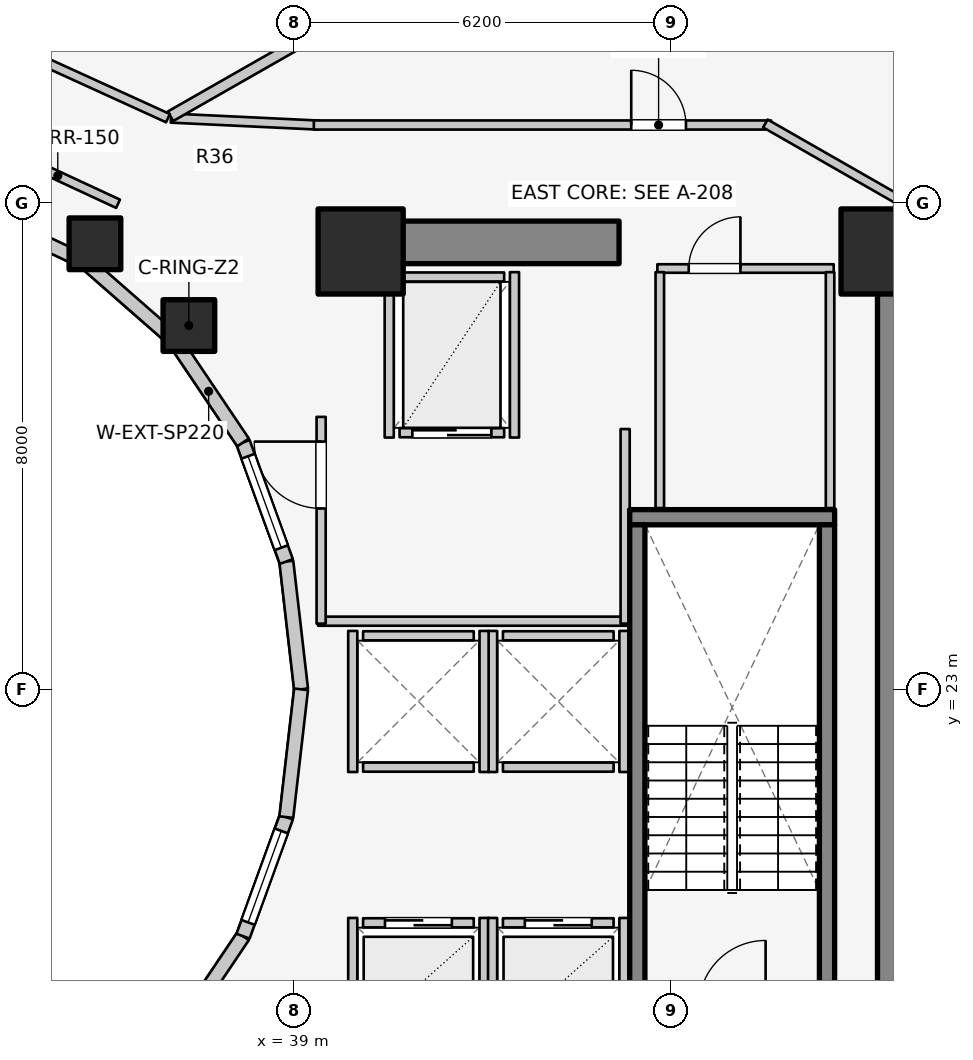
"""IFC4 building model, lengths in metres.
Left out: names, types, materials, properties, quantities, classifications, styles, units other than length and angle.
Written with IfcOpenShell. Run it as: python <this file> out.ifc"""

import sys

from ifc_helpers import new_model, si_unit, direction, frame, frame_2d, origin, origin_2d, place, context, subcontext, project, spatial, rectangle, extrude, element, fill, save


model = new_model("IFC4")
c1 = context("Model", 3, precision=1e-05, world=origin(), true_north=direction((0.0, 1.0)))
c2 = subcontext(c1, "Body", "Model", "MODEL_VIEW")
j1 = project(units=[si_unit("LENGTHUNIT", "METRE"), si_unit("PLANEANGLEUNIT", "RADIAN")], contexts=[c1])
p1 = place(None, origin())
s1 = spatial("IfcSite", under=j1, at=p1, CompositionType="ELEMENT")
p2 = place(p1, origin())
s2 = spatial("IfcBuilding", under=s1, at=p2, CompositionType="ELEMENT")
p3 = place(p2, frame((0.0, 0.0, 85.6)))
s3 = spatial("IfcBuildingStorey", under=s2, at=p3, CompositionType="ELEMENT", Elevation=85.6)
p4 = place(p3, frame((48.95, 17.05, 0.0), z_axis=(0.0, 0.0, 1.0), x_axis=(0.0, 1.0, 0.0)))
e1 = element("IfcWall", 1, at=p4, inside=s3, PredefinedType="SHEAR", context=c2, shape_type="SweptSolid", body=[
    extrude(rectangle(XDim=12.8, YDim=0.7, at=frame_2d((6.4, 0.0))), origin(), (0.0, 0.0, 1.0), 3.1),
])
p5 = place(p3, frame((39.85, 30.35, 0.0), z_axis=(0.0, 0.0, 1.0), x_axis=(1.0, 0.0, 0.0)))
e2 = element("IfcWall", 2, at=p5, inside=s3, PredefinedType="SHEAR", context=c2, shape_type="SweptSolid", body=[
    extrude(rectangle(XDim=4.5, YDim=0.7, at=frame_2d((2.25, 0.0))), origin(), (0.0, 0.0, 1.0), 3.1),
])
p6 = place(p3, frame((44.525, 25.83, 0.0), z_axis=(0.0, 0.0, 1.0), x_axis=(1.0, 0.0, 0.0)))
e3 = element("IfcWall", 3, at=p6, inside=s3, PredefinedType="SOLIDWALL", context=c2, shape_type="SweptSolid", body=[
    extrude(rectangle(XDim=3.37, YDim=0.25, at=frame_2d((1.685, 0.0))), origin(), (0.0, 0.0, 1.0), 3.1),
])
for number, where, z_axis, x_axis in (
    (4, (44.65, 17.895, 0.0), (0.0, 0.0, 1.0), (0.0, 1.0, 0.0)),
    (5, (47.77, 17.895, 0.0), (0.0, 0.0, 1.0), (0.0, 1.0, 0.0)),
):
    element("IfcWall", number, at=place(p3, frame(where, z_axis=z_axis, x_axis=x_axis)), inside=s3, PredefinedType="SOLIDWALL", context=c2, shape_type="SweptSolid", body=[
        extrude(rectangle(XDim=7.81, YDim=0.25, at=frame_2d((3.905, 0.0))), origin(), (0.0, 0.0, 1.0), 3.1),
    ])
for number, where, z_axis, x_axis in (
    (6, (48.7, 30.2, 0.0), (0.0, 0.0, 1.0), (1.0, 0.0, 0.0)),
    (7, (40.1, 30.2, 0.0), (0.0, 0.0, 1.0), (1.0, 0.0, 0.0)),
):
    element("IfcColumn", number, at=place(p3, frame(where, z_axis=z_axis, x_axis=x_axis)), inside=s3, PredefinedType="COLUMN", context=c2, shape_type="SweptSolid", body=[
        extrude(rectangle(XDim=1.4, YDim=1.4, at=origin_2d()), origin(), (0.0, 0.0, 1.0), 3.1),
    ])
for number, where, z_axis, x_axis in (
    (8, (37.275, 28.982, 0.0), (0.0, 0.0, 1.0), (1.0, 0.0, 0.0)),
    (9, (35.73, 30.327, 0.0), (0.0, 0.0, 1.0), (1.0, 0.0, 0.0)),
):
    element("IfcColumn", number, at=place(p3, frame(where, z_axis=z_axis, x_axis=x_axis)), inside=s3, PredefinedType="COLUMN", context=c2, shape_type="SweptSolid", body=[
        extrude(rectangle(XDim=0.85, YDim=0.85, at=origin_2d()), origin(), (0.0, 0.0, 1.0), 3.1),
    ])
p7 = place(p3, frame((39.12, 23.0, 0.0), z_axis=(0.0, 0.0, 1.0), x_axis=(-0.114711713601, 0.993398823617, 0.0)))
e10 = element("IfcWall", 10, at=p7, inside=s3, PredefinedType="STANDARD", context=c2, shape_type="SweptSolid", body=[
    extrude(rectangle(XDim=2.115, YDim=0.23, at=frame_2d((1.058, 0.0))), origin(), (0.0, 0.0, 1.0), 2.84),
])
p8 = place(p3, frame((38.877, 25.102, 0.0), z_axis=(0.0, 0.0, 1.0), x_axis=(-0.341423187295, 0.93990968033, 0.0)))
e11 = element("IfcWall", 11, at=p8, inside=s3, PredefinedType="STANDARD", context=c2, shape_type="SweptSolid", body=[
    extrude(rectangle(XDim=2.084, YDim=0.23, at=frame_2d((1.042, 0.0))), origin(), (0.0, 0.0, 1.0), 2.84),
])
p9 = place(p8, frame((0.242, 0.0, 0.85)))
e12 = element("IfcOpeningElement", 12, at=p9, cuts=e11, PredefinedType="OPENING", context=c2, shape_type="SweptSolid", body=[
    extrude(rectangle(XDim=1.6, YDim=1.65, at=frame_2d((0.8, 0.825))), frame((0.0, 0.125, 0.0), z_axis=(0.0, -1.0, 0.0), x_axis=(1.0, 0.0, 0.0)), (0.0, 0.0, 1.0), 0.25),
])
p10 = place(p3, frame((38.166, 27.06, 0.0), z_axis=(0.0, 0.0, 1.0), x_axis=(-0.558197800898, 0.829707909492, 0.0)))
e13 = element("IfcWall", 13, at=p10, inside=s3, PredefinedType="STANDARD", context=c2, shape_type="SweptSolid", body=[
    extrude(rectangle(XDim=2.027, YDim=0.23, at=frame_2d((1.013, 0.0))), origin(), (0.0, 0.0, 1.0), 2.16),
])
p11 = place(p3, frame((37.035, 28.742, 0.0), z_axis=(0.0, 0.0, 1.0), x_axis=(-0.752576694707, 0.658504607869, 0.0)))
e14 = element("IfcWall", 14, at=p11, inside=s3, PredefinedType="STANDARD", context=c2, shape_type="SweptSolid", body=[
    extrude(rectangle(XDim=1.959, YDim=0.23, at=frame_2d((0.98, 0.0))), origin(), (0.0, 0.0, 1.0), 2.16),
])
p12 = place(p3, frame((35.56, 30.032, 0.0), z_axis=(0.0, 0.0, 1.0), x_axis=(-0.904179699603, 0.427152280606, 0.0)))
e15 = element("IfcWall", 15, at=p12, inside=s3, PredefinedType="STANDARD", context=c2, shape_type="SweptSolid", body=[
    extrude(rectangle(XDim=1.899, YDim=0.23, at=frame_2d((0.95, 0.0))), origin(), (0.0, 0.0, 1.0), 2.16),
])
p13 = place(p3, frame((37.035, 17.258, 0.0), z_axis=(0.0, 0.0, 1.0), x_axis=(0.558197800898, 0.829707909492, 0.0)))
e16 = element("IfcWall", 16, at=p13, inside=s3, PredefinedType="STANDARD", context=c2, shape_type="SweptSolid", body=[
    extrude(rectangle(XDim=2.027, YDim=0.23, at=frame_2d((1.013, 0.0))), origin(), (0.0, 0.0, 1.0), 2.16),
])
p14 = place(p3, frame((38.166, 18.94, 0.0), z_axis=(0.0, 0.0, 1.0), x_axis=(0.341423187295, 0.93990968033, 0.0)))
e17 = element("IfcWall", 17, at=p14, inside=s3, PredefinedType="STANDARD", context=c2, shape_type="SweptSolid", body=[
    extrude(rectangle(XDim=2.084, YDim=0.23, at=frame_2d((1.042, 0.0))), origin(), (0.0, 0.0, 1.0), 2.84),
])
p15 = place(p14, frame((0.242, 0.0, 0.85)))
e18 = element("IfcOpeningElement", 18, at=p15, cuts=e17, PredefinedType="OPENING", context=c2, shape_type="SweptSolid", body=[
    extrude(rectangle(XDim=1.6, YDim=1.65, at=frame_2d((0.8, 0.825))), frame((0.0, 0.125, 0.0), z_axis=(0.0, -1.0, 0.0), x_axis=(1.0, 0.0, 0.0)), (0.0, 0.0, 1.0), 0.25),
])
p16 = place(p3, frame((38.877, 20.898, 0.0), z_axis=(0.0, 0.0, 1.0), x_axis=(0.114711713601, 0.993398823617, 0.0)))
e19 = element("IfcWall", 19, at=p16, inside=s3, PredefinedType="STANDARD", context=c2, shape_type="SweptSolid", body=[
    extrude(rectangle(XDim=2.115, YDim=0.23, at=frame_2d((1.058, 0.0))), origin(), (0.0, 0.0, 1.0), 2.84),
])
p17 = place(p3, frame((40.14, 19.16, 0.0), z_axis=(0.0, 0.0, 1.0), x_axis=(1.0, 0.0, 0.0)))
e20 = element("IfcWall", 20, at=p17, inside=s3, PredefinedType="SOLIDWALL", context=c2, shape_type="SweptSolid", body=[
    extrude(rectangle(XDim=1.82, YDim=0.15, at=frame_2d((0.91, 0.0))), origin(), (0.0, 0.0, 1.0), 2.12),
])
p18 = place(p17, frame((0.36, 0.0, 0.0)))
e21 = element("IfcOpeningElement", 21, at=p18, cuts=e20, PredefinedType="OPENING", context=c2, shape_type="SweptSolid", body=[
    extrude(rectangle(XDim=1.1, YDim=2.1, at=frame_2d((0.55, 1.05))), frame((0.0, 0.085, 0.0), z_axis=(0.0, -1.0, 0.0), x_axis=(1.0, 0.0, 0.0)), (0.0, 0.0, 1.0), 0.17),
])
p19 = place(p3, frame((39.97, 17.02, 0.0), z_axis=(0.0, 0.0, 1.0), x_axis=(0.0, 1.0, 0.0)))
e22 = element("IfcWall", 22, at=p19, inside=s3, PredefinedType="SOLIDWALL", context=c2, shape_type="SweptSolid", body=[
    extrude(rectangle(XDim=2.22, YDim=0.15, at=frame_2d((1.11, 0.0))), origin(), (0.0, 0.0, 1.0), 2.12),
])
p20 = place(p3, frame((42.13, 17.02, 0.0), z_axis=(0.0, 0.0, 1.0), x_axis=(0.0, 1.0, 0.0)))
e23 = element("IfcWall", 23, at=p20, inside=s3, PredefinedType="SOLIDWALL", context=c2, shape_type="SweptSolid", body=[
    extrude(rectangle(XDim=2.22, YDim=0.15, at=frame_2d((1.11, 0.0))), origin(), (0.0, 0.0, 1.0), 2.855),
])
p21 = place(p3, frame((42.44, 19.16, 0.0), z_axis=(0.0, 0.0, 1.0), x_axis=(1.0, 0.0, 0.0)))
e24 = element("IfcWall", 24, at=p21, inside=s3, PredefinedType="SOLIDWALL", context=c2, shape_type="SweptSolid", body=[
    extrude(rectangle(XDim=1.82, YDim=0.15, at=frame_2d((0.91, 0.0))), origin(), (0.0, 0.0, 1.0), 2.855),
])
p22 = place(p21, frame((0.36, 0.0, 0.0)))
e25 = element("IfcOpeningElement", 25, at=p22, cuts=e24, PredefinedType="OPENING", context=c2, shape_type="SweptSolid", body=[
    extrude(rectangle(XDim=1.1, YDim=2.1, at=frame_2d((0.55, 1.05))), frame((0.0, 0.085, 0.0), z_axis=(0.0, -1.0, 0.0), x_axis=(1.0, 0.0, 0.0)), (0.0, 0.0, 1.0), 0.17),
])
p23 = place(p3, frame((42.27, 17.02, 0.0), z_axis=(0.0, 0.0, 1.0), x_axis=(0.0, 1.0, 0.0)))
e26 = element("IfcWall", 26, at=p23, inside=s3, PredefinedType="SOLIDWALL", context=c2, shape_type="SweptSolid", body=[
    extrude(rectangle(XDim=2.22, YDim=0.15, at=frame_2d((1.11, 0.0))), origin(), (0.0, 0.0, 1.0), 2.855),
])
p24 = place(p3, frame((44.43, 17.02, 0.0), z_axis=(0.0, 0.0, 1.0), x_axis=(0.0, 1.0, 0.0)))
e27 = element("IfcWall", 27, at=p24, inside=s3, PredefinedType="SOLIDWALL", context=c2, shape_type="SweptSolid", body=[
    extrude(rectangle(XDim=2.22, YDim=0.15, at=frame_2d((1.11, 0.0))), origin(), (0.0, 0.0, 1.0), 2.12),
])
for number, where, z_axis, x_axis in (
    (28, (42.44, 21.72, 0.0), (0.0, 0.0, 1.0), (1.0, 0.0, 0.0)),
    (29, (42.44, 23.88, 0.0), (0.0, 0.0, 1.0), (1.0, 0.0, 0.0)),
):
    element("IfcWall", number, at=place(p3, frame(where, z_axis=z_axis, x_axis=x_axis)), inside=s3, PredefinedType="SOLIDWALL", context=c2, shape_type="SweptSolid", body=[
        extrude(rectangle(XDim=1.82, YDim=0.15, at=frame_2d((0.91, 0.0))), origin(), (0.0, 0.0, 1.0), 2.855),
    ])
for number, where, z_axis, x_axis in (
    (30, (42.27, 21.64, 0.0), (0.0, 0.0, 1.0), (0.0, 1.0, 0.0)),
    (31, (44.43, 21.64, 0.0), (0.0, 0.0, 1.0), (0.0, 1.0, 0.0)),
):
    element("IfcWall", number, at=place(p3, frame(where, z_axis=z_axis, x_axis=x_axis)), inside=s3, PredefinedType="SOLIDWALL", context=c2, shape_type="SweptSolid", body=[
        extrude(rectangle(XDim=2.32, YDim=0.15, at=frame_2d((1.16, 0.0))), origin(), (0.0, 0.0, 1.0), 2.855),
    ])
for number, where, z_axis, x_axis in (
    (32, (40.14, 21.72, 0.0), (0.0, 0.0, 1.0), (1.0, 0.0, 0.0)),
    (33, (40.14, 23.88, 0.0), (0.0, 0.0, 1.0), (1.0, 0.0, 0.0)),
):
    element("IfcWall", number, at=place(p3, frame(where, z_axis=z_axis, x_axis=x_axis)), inside=s3, PredefinedType="SOLIDWALL", context=c2, shape_type="SweptSolid", body=[
        extrude(rectangle(XDim=1.82, YDim=0.15, at=frame_2d((0.91, 0.0))), origin(), (0.0, 0.0, 1.0), 2.12),
    ])
p25 = place(p3, frame((39.97, 21.64, 0.0), z_axis=(0.0, 0.0, 1.0), x_axis=(0.0, 1.0, 0.0)))
e34 = element("IfcWall", 34, at=p25, inside=s3, PredefinedType="SOLIDWALL", context=c2, shape_type="SweptSolid", body=[
    extrude(rectangle(XDim=2.32, YDim=0.15, at=frame_2d((1.16, 0.0))), origin(), (0.0, 0.0, 1.0), 2.12),
])
p26 = place(p3, frame((42.13, 21.64, 0.0), z_axis=(0.0, 0.0, 1.0), x_axis=(0.0, 1.0, 0.0)))
e35 = element("IfcWall", 35, at=p26, inside=s3, PredefinedType="SOLIDWALL", context=c2, shape_type="SweptSolid", body=[
    extrude(rectangle(XDim=2.32, YDim=0.15, at=frame_2d((1.16, 0.0))), origin(), (0.0, 0.0, 1.0), 2.855),
])
p27 = place(p3, frame((40.74, 27.22, 0.0), z_axis=(0.0, 0.0, 1.0), x_axis=(1.0, 0.0, 0.0)))
e36 = element("IfcWall", 36, at=p27, inside=s3, PredefinedType="SOLIDWALL", context=c2, shape_type="SweptSolid", body=[
    extrude(rectangle(XDim=1.72, YDim=0.15, at=frame_2d((0.86, 0.0))), origin(), (0.0, 0.0, 1.0), 2.855),
])
p28 = place(p27, frame((0.21, 0.0, 0.0)))
e37 = element("IfcOpeningElement", 37, at=p28, cuts=e36, PredefinedType="OPENING", context=c2, shape_type="SweptSolid", body=[
    extrude(rectangle(XDim=1.3, YDim=2.1, at=frame_2d((0.65, 1.05))), frame((0.0, 0.085, 0.0), z_axis=(0.0, -1.0, 0.0), x_axis=(1.0, 0.0, 0.0)), (0.0, 0.0, 1.0), 0.17),
])
p29 = place(p3, frame((40.74, 29.78, 0.0), z_axis=(0.0, 0.0, 1.0), x_axis=(1.0, 0.0, 0.0)))
e38 = element("IfcWall", 38, at=p29, inside=s3, PredefinedType="SOLIDWALL", context=c2, shape_type="SweptSolid", body=[
    extrude(rectangle(XDim=1.72, YDim=0.15, at=frame_2d((0.86, 0.0))), origin(), (0.0, 0.0, 1.0), 2.855),
])
for number, where, z_axis, x_axis in (
    (39, (40.57, 27.14, 0.0), (0.0, 0.0, 1.0), (0.0, 1.0, 0.0)),
    (40, (42.63, 27.14, 0.0), (0.0, 0.0, 1.0), (0.0, 1.0, 0.0)),
):
    element("IfcWall", number, at=place(p3, frame(where, z_axis=z_axis, x_axis=x_axis)), inside=s3, PredefinedType="SOLIDWALL", context=c2, shape_type="SweptSolid", body=[
        extrude(rectangle(XDim=2.72, YDim=0.15, at=frame_2d((1.36, 0.0))), origin(), (0.0, 0.0, 1.0), 2.855),
    ])
p30 = place(p3, frame((39.4, 24.12, 0.0), z_axis=(0.0, 0.0, 1.0), x_axis=(1.0, 0.0, 0.0)))
e41 = element("IfcWall", 41, at=p30, inside=s3, PredefinedType="PARTITIONING", context=c2, shape_type="SweptSolid", body=[
    extrude(rectangle(XDim=5.08, YDim=0.15, at=frame_2d((2.54, 0.0))), origin(), (0.0, 0.0, 1.0), 2.12),
])
p31 = place(p3, frame((44.45, 24.08, 0.0), z_axis=(0.0, 0.0, 1.0), x_axis=(0.0, 1.0, 0.0)))
e42 = element("IfcWall", 42, at=p31, inside=s3, PredefinedType="PARTITIONING", context=c2, shape_type="SweptSolid", body=[
    extrude(rectangle(XDim=3.2, YDim=0.15, at=frame_2d((1.6, 0.0))), origin(), (0.0, 0.0, 1.0), 2.855),
])
p32 = place(p3, frame((39.45, 24.08, 0.0), z_axis=(0.0, 0.0, 1.0), x_axis=(0.0, 1.0, 0.0)))
e43 = element("IfcWall", 43, at=p32, inside=s3, PredefinedType="PARTITIONING", context=c2, shape_type="SweptSolid", body=[
    extrude(rectangle(XDim=3.4, YDim=0.15, at=frame_2d((1.7, 0.0))), origin(), (0.0, 0.0, 1.0), 2.855),
])
p33 = place(p32, frame((1.894, 0.0, 0.0)))
e44 = element("IfcOpeningElement", 44, at=p33, cuts=e43, PredefinedType="OPENING", context=c2, shape_type="SweptSolid", body=[
    extrude(rectangle(XDim=1.1, YDim=2.1, at=frame_2d((0.55, 1.05))), frame((0.0, 0.085, 0.0), z_axis=(0.0, -1.0, 0.0), x_axis=(1.0, 0.0, 0.0)), (0.0, 0.0, 1.0), 0.17),
])
p34 = place(p3, frame((44.98, 29.92, 0.0), z_axis=(0.0, 0.0, 1.0), x_axis=(1.0, 0.0, 0.0)))
e45 = element("IfcWall", 45, at=p34, inside=s3, PredefinedType="PLUMBINGWALL", context=c2, shape_type="SweptSolid", body=[
    extrude(rectangle(XDim=2.9, YDim=0.14, at=frame_2d((1.45, 0.0))), origin(), (0.0, 0.0, 1.0), 2.855),
])
p35 = place(p34, frame((0.516, 0.0, 0.0)))
e46 = element("IfcOpeningElement", 46, at=p35, cuts=e45, PredefinedType="OPENING", context=c2, shape_type="SweptSolid", body=[
    extrude(rectangle(XDim=0.85, YDim=2.05, at=frame_2d((0.425, 1.025))), frame((0.0, 0.08, 0.0), z_axis=(0.0, -1.0, 0.0), x_axis=(1.0, 0.0, 0.0)), (0.0, 0.0, 1.0), 0.16),
])
for number, where, z_axis, x_axis in (
    (47, (45.02, 25.98, 0.0), (0.0, 0.0, 1.0), (0.0, 1.0, 0.0)),
    (48, (47.82, 25.98, 0.0), (0.0, 0.0, 1.0), (0.0, 1.0, 0.0)),
):
    element("IfcWall", number, at=place(p3, frame(where, z_axis=z_axis, x_axis=x_axis)), inside=s3, PredefinedType="PLUMBINGWALL", context=c2, shape_type="SweptSolid", body=[
        extrude(rectangle(XDim=3.88, YDim=0.14, at=frame_2d((1.94, 0.0))), origin(), (0.0, 0.0, 1.0), 2.855),
    ])
p36 = place(p3, frame((36.11, 30.985, 0.0), z_axis=(0.0, 0.0, 1.0), x_axis=(-0.906943449489, 0.421252393975, 0.0)))
e49 = element("IfcWall", 49, at=p36, inside=s3, PredefinedType="PARTITIONING", context=c2, shape_type="SweptSolid", body=[
    extrude(rectangle(XDim=2.186, YDim=0.15, at=frame_2d((1.093, 0.0))), origin(), (0.0, 0.0, 1.0), 2.272),
])
p37 = place(p3, frame((36.98, 32.394, 0.0), z_axis=(0.0, 0.0, 1.0), x_axis=(0.998877427952, -0.047369651964, 0.0)))
e50 = element("IfcWall", 50, at=p37, inside=s3, PredefinedType="PARTITIONING", context=c2, shape_type="SweptSolid", body=[
    extrude(rectangle(XDim=2.433, YDim=0.15, at=frame_2d((1.216, 0.0))), origin(), (0.0, 0.0, 1.0), 2.272),
])
p38 = place(p3, frame((39.33, 32.28, 0.0), z_axis=(0.0, 0.0, 1.0), x_axis=(1.0, 0.0, 0.0)))
e51 = element("IfcWall", 51, at=p38, inside=s3, PredefinedType="PARTITIONING", context=c2, shape_type="SweptSolid", body=[
    extrude(rectangle(XDim=7.52, YDim=0.15, at=frame_2d((3.76, 0.0))), origin(), (0.0, 0.0, 1.0), 2.272),
])
p39 = place(p38, frame((5.22, 0.0, 0.0)))
e52 = element("IfcOpeningElement", 52, at=p39, cuts=e51, PredefinedType="OPENING", context=c2, shape_type="SweptSolid", body=[
    extrude(rectangle(XDim=0.9, YDim=2.1, at=frame_2d((0.45, 1.05))), frame((0.0, 0.085, 0.0), z_axis=(0.0, -1.0, 0.0), x_axis=(1.0, 0.0, 0.0)), (0.0, 0.0, 1.0), 0.17),
])
p40 = place(p3, frame((46.757, 32.305, 0.0), z_axis=(0.0, 0.0, 1.0), x_axis=(0.867991349648, -0.496579315857, 0.0)))
e53 = element("IfcWall", 53, at=p40, inside=s3, PredefinedType="PARTITIONING", context=c2, shape_type="SweptSolid", body=[
    extrude(rectangle(XDim=2.567, YDim=0.15, at=frame_2d((1.283, 0.0))), origin(), (0.0, 0.0, 1.0), 2.142),
])
p41 = place(p3, frame((36.973, 32.424, 0.0), z_axis=(0.0, 0.0, 1.0), x_axis=(0.868484076301, 0.495717065685, 0.0)))
e54 = element("IfcWall", 54, at=p41, inside=s3, PredefinedType="PARTITIONING", context=c2, shape_type="SweptSolid", body=[
    extrude(rectangle(XDim=8.789, YDim=0.18, at=frame_2d((4.394, 0.0))), origin(), (0.0, 0.0, 1.0), 2.272),
])
p42 = place(p3, frame((36.931, 32.393, 0.0), z_axis=(0.0, 0.0, 1.0), x_axis=(-0.909747571199, 0.415161843982, 0.0)))
e55 = element("IfcWall", 55, at=p42, inside=s3, PredefinedType="PARTITIONING", context=c2, shape_type="SweptSolid", body=[
    extrude(rectangle(XDim=2.625, YDim=0.15, at=frame_2d((1.312, 0.0))), origin(), (0.0, 0.0, 1.0), 2.272),
])
p43 = place(p9, origin())
e56 = element("IfcWindow", 56, at=p43, inside=s3, PartitioningType="SINGLE_PANEL", PredefinedType="WINDOW", context=c2, shape_type="SweptSolid", body=[
    extrude(rectangle(XDim=1.6, YDim=1.65, at=frame_2d((0.8, 0.825))), frame((0.0, 0.03, 0.0), z_axis=(0.0, -1.0, 0.0), x_axis=(1.0, 0.0, 0.0)), (0.0, 0.0, 1.0), 0.06),
])
fill(e12, e56)
p44 = place(p15, origin())
e57 = element("IfcWindow", 57, at=p44, inside=s3, PartitioningType="SINGLE_PANEL", PredefinedType="WINDOW", context=c2, shape_type="SweptSolid", body=[
    extrude(rectangle(XDim=1.6, YDim=1.65, at=frame_2d((0.8, 0.825))), frame((0.0, 0.03, 0.0), z_axis=(0.0, -1.0, 0.0), x_axis=(1.0, 0.0, 0.0)), (0.0, 0.0, 1.0), 0.06),
])
fill(e18, e57)
p45 = place(p18, origin())
e58 = element("IfcDoor", 58, at=p45, inside=s3, OperationType="DOUBLE_DOOR_SLIDING", PredefinedType="DOOR", context=c2, shape_type="SweptSolid", body=[
    extrude(rectangle(XDim=1.1, YDim=2.1, at=frame_2d((0.55, 1.05))), frame((0.0, 0.025, 0.0), z_axis=(0.0, -1.0, 0.0), x_axis=(1.0, 0.0, 0.0)), (0.0, 0.0, 1.0), 0.05),
])
fill(e21, e58)
p46 = place(p22, origin())
e59 = element("IfcDoor", 59, at=p46, inside=s3, OperationType="DOUBLE_DOOR_SLIDING", PredefinedType="DOOR", context=c2, shape_type="SweptSolid", body=[
    extrude(rectangle(XDim=1.1, YDim=2.1, at=frame_2d((0.55, 1.05))), frame((0.0, 0.025, 0.0), z_axis=(0.0, -1.0, 0.0), x_axis=(1.0, 0.0, 0.0)), (0.0, 0.0, 1.0), 0.05),
])
fill(e25, e59)
p47 = place(p28, origin())
e60 = element("IfcDoor", 60, at=p47, inside=s3, OperationType="DOUBLE_DOOR_SLIDING", PredefinedType="DOOR", context=c2, shape_type="SweptSolid", body=[
    extrude(rectangle(XDim=1.3, YDim=2.1, at=frame_2d((0.65, 1.05))), frame((0.0, 0.025, 0.0), z_axis=(0.0, -1.0, 0.0), x_axis=(1.0, 0.0, 0.0)), (0.0, 0.0, 1.0), 0.05),
])
fill(e37, e60)
p48 = place(p33, origin())
e61 = element("IfcDoor", 61, at=p48, inside=s3, OperationType="SINGLE_SWING_RIGHT", PredefinedType="DOOR", context=c2, shape_type="SweptSolid", body=[
    extrude(rectangle(XDim=1.1, YDim=2.1, at=frame_2d((0.55, 1.05))), frame((0.0, 0.025, 0.0), z_axis=(0.0, -1.0, 0.0), x_axis=(1.0, 0.0, 0.0)), (0.0, 0.0, 1.0), 0.05),
])
fill(e44, e61)
p49 = place(p35, origin())
e62 = element("IfcDoor", 62, at=p49, inside=s3, OperationType="SINGLE_SWING_RIGHT", PredefinedType="DOOR", context=c2, shape_type="SweptSolid", body=[
    extrude(rectangle(XDim=0.85, YDim=2.05, at=frame_2d((0.425, 1.025))), frame((0.0, 0.025, 0.0), z_axis=(0.0, -1.0, 0.0), x_axis=(1.0, 0.0, 0.0)), (0.0, 0.0, 1.0), 0.05),
])
fill(e46, e62)
p50 = place(p39, origin())
e63 = element("IfcDoor", 63, at=p50, inside=s3, OperationType="SINGLE_SWING_LEFT", PredefinedType="DOOR", context=c2, shape_type="SweptSolid", body=[
    extrude(rectangle(XDim=0.9, YDim=2.1, at=frame_2d((0.45, 1.05))), frame((0.0, 0.025, 0.0), z_axis=(0.0, -1.0, 0.0), x_axis=(1.0, 0.0, 0.0)), (0.0, 0.0, 1.0), 0.05),
])
fill(e52, e63)
save(model, sys.argv[1])
